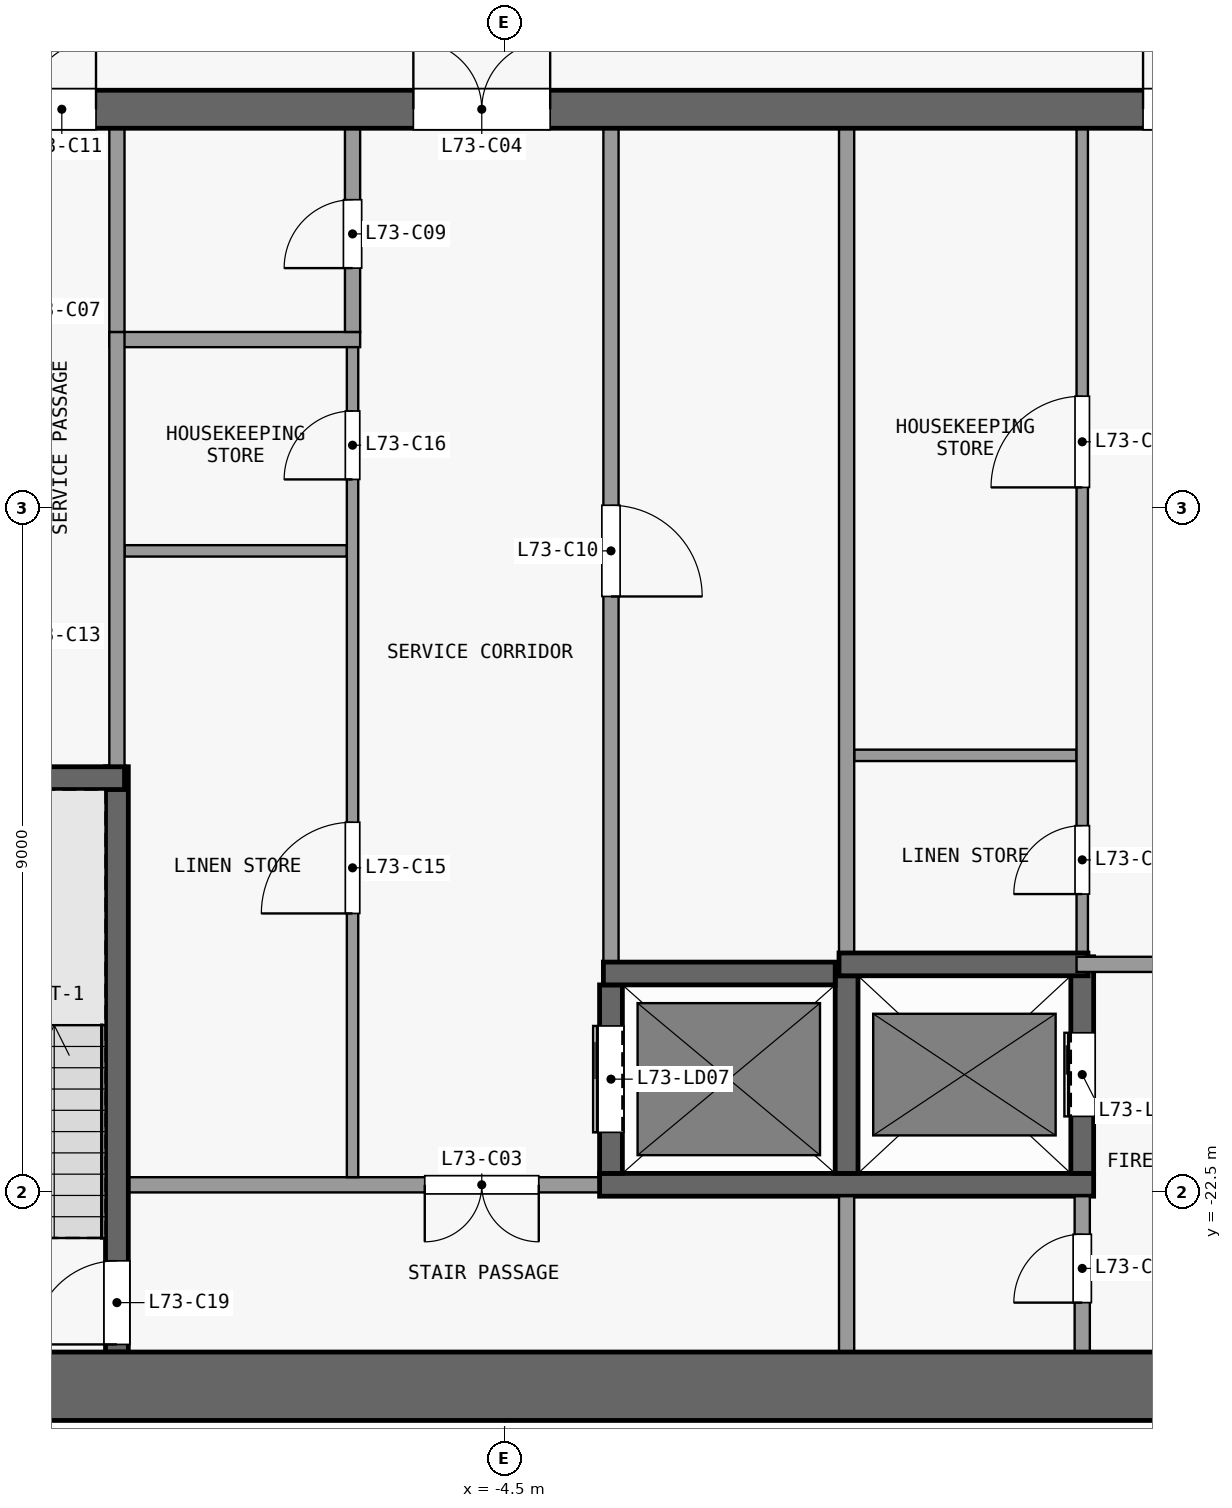
"""IFC4 building model, lengths in metres.
Left out: names, types, materials, properties, quantities, classifications, styles, units other than length and angle.
Written with IfcOpenShell. Run it as: python <this file> out.ifc"""

import sys

from ifc_helpers import new_model, si_unit, direction, frame, frame_2d, origin, place, context, subcontext, project, spatial, rectangle, extrude, element, fill, save


model = new_model("IFC4")
c1 = context("Model", 3, precision=1e-05, world=origin(), true_north=direction((0.0, 1.0)))
c2 = subcontext(c1, "Body", "Model", "MODEL_VIEW")
j1 = project(units=[si_unit("LENGTHUNIT", "METRE"), si_unit("PLANEANGLEUNIT", "RADIAN")], contexts=[c1])
p1 = place(None, origin())
s1 = spatial("IfcSite", under=j1, at=p1, CompositionType="ELEMENT")
p2 = place(p1, origin())
s2 = spatial("IfcBuilding", under=s1, at=p2, CompositionType="ELEMENT")
p3 = place(p2, frame((0.0, 0.0, 287.9)))
s3 = spatial("IfcBuildingStorey", under=s2, at=p3, CompositionType="ELEMENT", Elevation=287.9)
p4 = place(p3, frame((-13.1, -25.05, 0.0), z_axis=(0.0, 0.0, 1.0), x_axis=(1.0, 0.0, 0.0)))
e1 = element("IfcWall", 1, at=p4, inside=s3, PredefinedType="SHEAR", context=c2, shape_type="SweptSolid", body=[
    extrude(rectangle(XDim=26.2, YDim=0.9, at=frame_2d((13.1, 0.0))), origin(), (0.0, 0.0, 1.0), 3.3),
])
p5 = place(p3, frame((-13.1, -8.25, 0.0), z_axis=(0.0, 0.0, 1.0), x_axis=(1.0, 0.0, 0.0)))
e2 = element("IfcWall", 2, at=p5, inside=s3, PredefinedType="SHEAR", context=c2, shape_type="SweptSolid", body=[
    extrude(rectangle(XDim=26.2, YDim=0.5, at=frame_2d((13.1, 0.0))), origin(), (0.0, 0.0, 1.0), 3.3),
])
p6 = place(p5, frame((7.4, 0.0, 0.0)))
e3 = element("IfcOpeningElement", 3, at=p6, cuts=e2, PredefinedType="OPENING", context=c2, shape_type="SweptSolid", body=[
    extrude(rectangle(XDim=1.8, YDim=2.1, at=frame_2d((0.9, 1.05))), frame((0.0, 0.26, 0.0), z_axis=(0.0, -1.0, 0.0), x_axis=(1.0, 0.0, 0.0)), (0.0, 0.0, 1.0), 0.52),
])
p7 = place(p5, frame((17.0, 0.0, 0.0)))
e4 = element("IfcOpeningElement", 4, at=p7, cuts=e2, PredefinedType="OPENING", context=c2, shape_type="SweptSolid", body=[
    extrude(rectangle(XDim=1.8, YDim=2.1, at=frame_2d((0.9, 1.05))), frame((0.0, 0.26, 0.0), z_axis=(0.0, -1.0, 0.0), x_axis=(1.0, 0.0, 0.0)), (0.0, 0.0, 1.0), 0.52),
])
p8 = place(p5, frame((2.325, 0.0, 0.0)))
e5 = element("IfcOpeningElement", 5, at=p8, cuts=e2, PredefinedType="OPENING", context=c2, shape_type="SweptSolid", body=[
    extrude(rectangle(XDim=0.9, YDim=2.1, at=frame_2d((0.45, 1.05))), frame((0.0, 0.26, 0.0), z_axis=(0.0, -1.0, 0.0), x_axis=(1.0, 0.0, 0.0)), (0.0, 0.0, 1.0), 0.52),
])
p9 = place(p5, frame((22.975, 0.0, 0.0)))
e6 = element("IfcOpeningElement", 6, at=p9, cuts=e2, PredefinedType="OPENING", context=c2, shape_type="SweptSolid", body=[
    extrude(rectangle(XDim=0.9, YDim=2.1, at=frame_2d((0.45, 1.05))), frame((0.0, 0.26, 0.0), z_axis=(0.0, -1.0, 0.0), x_axis=(1.0, 0.0, 0.0)), (0.0, 0.0, 1.0), 0.52),
])
p10 = place(p3, frame((-3.25, -22.4, 0.0), z_axis=(0.0, 0.0, 1.0), x_axis=(-1.0, 0.0, 0.0)))
e7 = element("IfcWall", 7, at=p10, inside=s3, PredefinedType="PARTITIONING", context=c2, shape_type="SweptSolid", body=[
    extrude(rectangle(XDim=6.2, YDim=0.2, at=frame_2d((3.1, 0.0))), origin(), (0.0, 0.0, 1.0), 3.3),
])
p11 = place(p10, frame((0.8, 0.0, 0.0)))
e8 = element("IfcOpeningElement", 8, at=p11, cuts=e7, PredefinedType="OPENING", context=c2, shape_type="SweptSolid", body=[
    extrude(rectangle(XDim=1.5, YDim=2.1, at=frame_2d((0.75, 1.05))), frame((0.0, 0.11, 0.0), z_axis=(0.0, -1.0, 0.0), x_axis=(1.0, 0.0, 0.0)), (0.0, 0.0, 1.0), 0.22),
])
p12 = place(p3, frame((-3.25, -22.4, 0.0), z_axis=(0.0, 0.0, 1.0), x_axis=(1.0, 0.0, 0.0)))
e9 = element("IfcWall", 9, at=p12, inside=s3, PredefinedType="SHEAR", context=c2, shape_type="SweptSolid", body=[
    extrude(rectangle(XDim=6.5, YDim=0.3, at=frame_2d((3.25, 0.0))), origin(), (0.0, 0.0, 1.0), 3.3),
])
p13 = place(p3, frame((-3.2, -19.62, 0.0), z_axis=(0.0, 0.0, 1.0), x_axis=(1.0, 0.0, 0.0)))
e10 = element("IfcWall", 10, at=p13, inside=s3, PredefinedType="SHEAR", context=c2, shape_type="SweptSolid", body=[
    extrude(rectangle(XDim=3.05, YDim=0.3, at=frame_2d((1.525, 0.0))), origin(), (0.0, 0.0, 1.0), 3.3),
])
p14 = place(p3, frame((-0.1, -19.5, 0.0), z_axis=(0.0, 0.0, 1.0), x_axis=(1.0, 0.0, 0.0)))
e11 = element("IfcWall", 11, at=p14, inside=s3, PredefinedType="SHEAR", context=c2, shape_type="SweptSolid", body=[
    extrude(rectangle(XDim=3.275, YDim=0.3, at=frame_2d((1.638, 0.0))), origin(), (0.0, 0.0, 1.0), 3.3),
])
p15 = place(p3, frame((6.35, -19.5, 0.0), z_axis=(0.0, 0.0, 1.0), x_axis=(-1.0, 0.0, 0.0)))
e12 = element("IfcWall", 12, at=p15, inside=s3, PredefinedType="PARTITIONING", context=c2, shape_type="SweptSolid", body=[
    extrude(rectangle(XDim=3.325, YDim=0.2, at=frame_2d((1.663, 0.0))), origin(), (0.0, 0.0, 1.0), 3.3),
])
p16 = place(p15, frame((0.8, 0.0, 0.0)))
e13 = element("IfcOpeningElement", 13, at=p16, cuts=e12, PredefinedType="OPENING", context=c2, shape_type="SweptSolid", body=[
    extrude(rectangle(XDim=1.5, YDim=2.1, at=frame_2d((0.75, 1.05))), frame((0.0, 0.11, 0.0), z_axis=(0.0, -1.0, 0.0), x_axis=(1.0, 0.0, 0.0)), (0.0, 0.0, 1.0), 0.22),
])
p17 = place(p3, frame((-12.6, -17.05, 0.0), z_axis=(0.0, 0.0, 1.0), x_axis=(1.0, 0.0, 0.0)))
e14 = element("IfcWall", 14, at=p17, inside=s3, PredefinedType="SHEAR", context=c2, shape_type="SweptSolid", body=[
    extrude(rectangle(XDim=3.1, YDim=0.3, at=frame_2d((1.55, 0.0))), origin(), (0.0, 0.0, 1.0), 3.3),
])
p18 = place(p3, frame((0.1, -16.75, 0.0), z_axis=(0.0, 0.0, 1.0), x_axis=(1.0, 0.0, 0.0)))
e15 = element("IfcWall", 15, at=p18, inside=s3, PredefinedType="PARTITIONING", context=c2, shape_type="SweptSolid", body=[
    extrude(rectangle(XDim=2.925, YDim=0.15, at=frame_2d((1.462, 0.0))), origin(), (0.0, 0.0, 1.0), 3.3),
])
p19 = place(p3, frame((-9.5, -14.06, 0.0), z_axis=(0.0, 0.0, 1.0), x_axis=(1.0, 0.0, 0.0)))
e16 = element("IfcWall", 16, at=p19, inside=s3, PredefinedType="PARTITIONING", context=c2, shape_type="SweptSolid", body=[
    extrude(rectangle(XDim=2.925, YDim=0.15, at=frame_2d((1.462, 0.0))), origin(), (0.0, 0.0, 1.0), 3.3),
])
p20 = place(p3, frame((-9.7, -11.28, 0.0), z_axis=(0.0, 0.0, 1.0), x_axis=(1.0, 0.0, 0.0)))
e17 = element("IfcWall", 17, at=p20, inside=s3, PredefinedType="PARTITIONING", context=c2, shape_type="SweptSolid", body=[
    extrude(rectangle(XDim=3.3, YDim=0.2, at=frame_2d((1.65, 0.0))), origin(), (0.0, 0.0, 1.0), 3.3),
])
p21 = place(p3, frame((-9.6, -24.6, 0.0), z_axis=(0.0, 0.0, 1.0), x_axis=(0.0, 1.0, 0.0)))
e18 = element("IfcWall", 18, at=p21, inside=s3, PredefinedType="SHEAR", context=c2, shape_type="SweptSolid", body=[
    extrude(rectangle(XDim=7.7, YDim=0.3, at=frame_2d((3.85, 0.0))), origin(), (0.0, 0.0, 1.0), 3.3),
])
p22 = place(p21, frame((0.1, 0.0, 0.0)))
e19 = element("IfcOpeningElement", 19, at=p22, cuts=e18, PredefinedType="OPENING", context=c2, shape_type="SweptSolid", body=[
    extrude(rectangle(XDim=1.1, YDim=2.1, at=frame_2d((0.55, 1.05))), frame((0.0, 0.16, 0.0), z_axis=(0.0, -1.0, 0.0), x_axis=(1.0, 0.0, 0.0)), (0.0, 0.0, 1.0), 0.32),
])
p23 = place(p3, frame((-9.6, -16.9, 0.0), z_axis=(0.0, 0.0, 1.0), x_axis=(0.0, 1.0, 0.0)))
e20 = element("IfcWall", 20, at=p23, inside=s3, PredefinedType="PARTITIONING", context=c2, shape_type="SweptSolid", body=[
    extrude(rectangle(XDim=5.72, YDim=0.2, at=frame_2d((2.86, 0.0))), origin(), (0.0, 0.0, 1.0), 3.3),
])
p24 = place(p3, frame((-9.6, -11.18, 0.0), z_axis=(0.0, 0.0, 1.0), x_axis=(0.0, 1.0, 0.0)))
e21 = element("IfcWall", 21, at=p24, inside=s3, PredefinedType="PARTITIONING", context=c2, shape_type="SweptSolid", body=[
    extrude(rectangle(XDim=2.68, YDim=0.2, at=frame_2d((1.34, 0.0))), origin(), (0.0, 0.0, 1.0), 3.3),
])
p25 = place(p3, frame((-6.5, -22.3, 0.0), z_axis=(0.0, 0.0, 1.0), x_axis=(0.0, 1.0, 0.0)))
e22 = element("IfcWall", 22, at=p25, inside=s3, PredefinedType="PARTITIONING", context=c2, shape_type="SweptSolid", body=[
    extrude(rectangle(XDim=10.92, YDim=0.15, at=frame_2d((5.46, 0.0))), origin(), (0.0, 0.0, 1.0), 3.3),
])
p26 = place(p25, frame((3.47, 0.0, 0.0)))
e23 = element("IfcOpeningElement", 23, at=p26, cuts=e22, PredefinedType="OPENING", context=c2, shape_type="SweptSolid", body=[
    extrude(rectangle(XDim=1.2, YDim=2.1, at=frame_2d((0.6, 1.05))), frame((0.0, 0.085, 0.0), z_axis=(0.0, -1.0, 0.0), x_axis=(1.0, 0.0, 0.0)), (0.0, 0.0, 1.0), 0.17),
])
p27 = place(p25, frame((9.18, 0.0, 0.0)))
e24 = element("IfcOpeningElement", 24, at=p27, cuts=e22, PredefinedType="OPENING", context=c2, shape_type="SweptSolid", body=[
    extrude(rectangle(XDim=0.9, YDim=2.1, at=frame_2d((0.45, 1.05))), frame((0.0, 0.085, 0.0), z_axis=(0.0, -1.0, 0.0), x_axis=(1.0, 0.0, 0.0)), (0.0, 0.0, 1.0), 0.17),
])
p28 = place(p3, frame((-6.5, -11.18, 0.0), z_axis=(0.0, 0.0, 1.0), x_axis=(0.0, 1.0, 0.0)))
e25 = element("IfcWall", 25, at=p28, inside=s3, PredefinedType="PARTITIONING", context=c2, shape_type="SweptSolid", body=[
    extrude(rectangle(XDim=2.68, YDim=0.2, at=frame_2d((1.34, 0.0))), origin(), (0.0, 0.0, 1.0), 3.3),
])
p29 = place(p28, frame((0.84, 0.0, 0.0)))
e26 = element("IfcOpeningElement", 26, at=p29, cuts=e25, PredefinedType="OPENING", context=c2, shape_type="SweptSolid", body=[
    extrude(rectangle(XDim=0.9, YDim=2.1, at=frame_2d((0.45, 1.05))), frame((0.0, 0.11, 0.0), z_axis=(0.0, -1.0, 0.0), x_axis=(1.0, 0.0, 0.0)), (0.0, 0.0, 1.0), 0.22),
])
p30 = place(p3, frame((-3.1, -22.25, 0.0), z_axis=(0.0, 0.0, 1.0), x_axis=(0.0, 1.0, 0.0)))
e27 = element("IfcWall", 27, at=p30, inside=s3, PredefinedType="SHEAR", context=c2, shape_type="SweptSolid", body=[
    extrude(rectangle(XDim=2.48, YDim=0.3, at=frame_2d((1.24, 0.0))), origin(), (0.0, 0.0, 1.0), 3.3),
])
p31 = place(p30, frame((0.54, 0.0, 0.0)))
e28 = element("IfcOpeningElement", 28, at=p31, cuts=e27, PredefinedType="OPENING", context=c2, shape_type="SweptSolid", body=[
    extrude(rectangle(XDim=1.4, YDim=2.1, at=frame_2d((0.7, 1.05))), frame((0.0, 0.16, 0.0), z_axis=(0.0, -1.0, 0.0), x_axis=(1.0, 0.0, 0.0)), (0.0, 0.0, 1.0), 0.32),
])
p32 = place(p3, frame((-3.1, -8.5, 0.0), z_axis=(0.0, 0.0, 1.0), x_axis=(0.0, -1.0, 0.0)))
e29 = element("IfcWall", 29, at=p32, inside=s3, PredefinedType="PARTITIONING", context=c2, shape_type="SweptSolid", body=[
    extrude(rectangle(XDim=10.97, YDim=0.2, at=frame_2d((5.485, 0.0))), origin(), (0.0, 0.0, 1.0), 3.3),
])
p33 = place(p32, frame((4.96, 0.0, 0.0)))
e30 = element("IfcOpeningElement", 30, at=p33, cuts=e29, PredefinedType="OPENING", context=c2, shape_type="SweptSolid", body=[
    extrude(rectangle(XDim=1.2, YDim=2.1, at=frame_2d((0.6, 1.05))), frame((0.0, 0.11, 0.0), z_axis=(0.0, -1.0, 0.0), x_axis=(1.0, 0.0, 0.0)), (0.0, 0.0, 1.0), 0.22),
])
p34 = place(p3, frame((0.0, -24.6, 0.0), z_axis=(0.0, 0.0, 1.0), x_axis=(0.0, 1.0, 0.0)))
e31 = element("IfcWall", 31, at=p34, inside=s3, PredefinedType="PARTITIONING", context=c2, shape_type="SweptSolid", body=[
    extrude(rectangle(XDim=2.05, YDim=0.2, at=frame_2d((1.025, 0.0))), origin(), (0.0, 0.0, 1.0), 3.3),
])
p35 = place(p3, frame((0.0, -22.25, 0.0), z_axis=(0.0, 0.0, 1.0), x_axis=(0.0, 1.0, 0.0)))
e32 = element("IfcWall", 32, at=p35, inside=s3, PredefinedType="SHEAR", context=c2, shape_type="SweptSolid", body=[
    extrude(rectangle(XDim=2.6, YDim=0.3, at=frame_2d((1.3, 0.0))), origin(), (0.0, 0.0, 1.0), 3.3),
])
p36 = place(p3, frame((0.0, -19.35, 0.0), z_axis=(0.0, 0.0, 1.0), x_axis=(0.0, 1.0, 0.0)))
e33 = element("IfcWall", 33, at=p36, inside=s3, PredefinedType="PARTITIONING", context=c2, shape_type="SweptSolid", body=[
    extrude(rectangle(XDim=10.85, YDim=0.2, at=frame_2d((5.425, 0.0))), origin(), (0.0, 0.0, 1.0), 3.3),
])
p37 = place(p3, frame((3.1, -24.6, 0.0), z_axis=(0.0, 0.0, 1.0), x_axis=(0.0, 1.0, 0.0)))
e34 = element("IfcWall", 34, at=p37, inside=s3, PredefinedType="PARTITIONING", context=c2, shape_type="SweptSolid", body=[
    extrude(rectangle(XDim=2.05, YDim=0.2, at=frame_2d((1.025, 0.0))), origin(), (0.0, 0.0, 1.0), 3.3),
])
p38 = place(p37, frame((0.65, 0.0, 0.0)))
e35 = element("IfcOpeningElement", 35, at=p38, cuts=e34, PredefinedType="OPENING", context=c2, shape_type="SweptSolid", body=[
    extrude(rectangle(XDim=0.9, YDim=2.1, at=frame_2d((0.45, 1.05))), frame((0.0, 0.11, 0.0), z_axis=(0.0, -1.0, 0.0), x_axis=(1.0, 0.0, 0.0)), (0.0, 0.0, 1.0), 0.22),
])
p39 = place(p3, frame((3.1, -22.25, 0.0), z_axis=(0.0, 0.0, 1.0), x_axis=(0.0, 1.0, 0.0)))
e36 = element("IfcWall", 36, at=p39, inside=s3, PredefinedType="SHEAR", context=c2, shape_type="SweptSolid", body=[
    extrude(rectangle(XDim=2.85, YDim=0.3, at=frame_2d((1.425, 0.0))), origin(), (0.0, 0.0, 1.0), 3.3),
])
p40 = place(p39, frame((0.75, 0.0, 0.0)))
e37 = element("IfcOpeningElement", 37, at=p40, cuts=e36, PredefinedType="OPENING", context=c2, shape_type="SweptSolid", body=[
    extrude(rectangle(XDim=1.1, YDim=2.1, at=frame_2d((0.55, 1.05))), frame((0.0, 0.16, 0.0), z_axis=(0.0, -1.0, 0.0), x_axis=(1.0, 0.0, 0.0)), (0.0, 0.0, 1.0), 0.32),
])
p41 = place(p3, frame((3.1, -19.4, 0.0), z_axis=(0.0, 0.0, 1.0), x_axis=(0.0, 1.0, 0.0)))
e38 = element("IfcWall", 38, at=p41, inside=s3, PredefinedType="PARTITIONING", context=c2, shape_type="SweptSolid", body=[
    extrude(rectangle(XDim=10.9, YDim=0.15, at=frame_2d((5.45, 0.0))), origin(), (0.0, 0.0, 1.0), 3.3),
])
p42 = place(p41, frame((0.825, 0.0, 0.0)))
e39 = element("IfcOpeningElement", 39, at=p42, cuts=e38, PredefinedType="OPENING", context=c2, shape_type="SweptSolid", body=[
    extrude(rectangle(XDim=0.9, YDim=2.1, at=frame_2d((0.45, 1.05))), frame((0.0, 0.085, 0.0), z_axis=(0.0, -1.0, 0.0), x_axis=(1.0, 0.0, 0.0)), (0.0, 0.0, 1.0), 0.17),
])
p43 = place(p41, frame((6.175, 0.0, 0.0)))
e40 = element("IfcOpeningElement", 40, at=p43, cuts=e38, PredefinedType="OPENING", context=c2, shape_type="SweptSolid", body=[
    extrude(rectangle(XDim=1.2, YDim=2.1, at=frame_2d((0.6, 1.05))), frame((0.0, 0.085, 0.0), z_axis=(0.0, -1.0, 0.0), x_axis=(1.0, 0.0, 0.0)), (0.0, 0.0, 1.0), 0.17),
])
p44 = place(p40, origin())
e41 = element("IfcDoor", 41, at=p44, inside=s3, OperationType="DOUBLE_DOOR_SLIDING", PredefinedType="DOOR", context=c2, shape_type="SweptSolid", body=[
    extrude(rectangle(XDim=1.1, YDim=2.1, at=frame_2d((0.55, 1.05))), frame((0.0, 0.025, 0.0), z_axis=(0.0, -1.0, 0.0), x_axis=(1.0, 0.0, 0.0)), (0.0, 0.0, 1.0), 0.05),
])
fill(e37, e41)
p45 = place(p31, origin())
e42 = element("IfcDoor", 42, at=p45, inside=s3, OperationType="DOUBLE_DOOR_SLIDING", PredefinedType="DOOR", context=c2, shape_type="SweptSolid", body=[
    extrude(rectangle(XDim=1.4, YDim=2.1, at=frame_2d((0.7, 1.05))), frame((0.0, 0.025, 0.0), z_axis=(0.0, -1.0, 0.0), x_axis=(1.0, 0.0, 0.0)), (0.0, 0.0, 1.0), 0.05),
])
fill(e28, e42)
p46 = place(p11, origin())
e43 = element("IfcDoor", 43, at=p46, inside=s3, OperationType="DOUBLE_DOOR_SINGLE_SWING", PredefinedType="DOOR", context=c2, shape_type="SweptSolid", body=[
    extrude(rectangle(XDim=1.5, YDim=2.1, at=frame_2d((0.75, 1.05))), frame((0.0, 0.025, 0.0), z_axis=(0.0, -1.0, 0.0), x_axis=(1.0, 0.0, 0.0)), (0.0, 0.0, 1.0), 0.05),
])
fill(e8, e43)
p47 = place(p6, origin())
e44 = element("IfcDoor", 44, at=p47, inside=s3, OperationType="DOUBLE_DOOR_SINGLE_SWING", PredefinedType="DOOR", context=c2, shape_type="SweptSolid", body=[
    extrude(rectangle(XDim=1.8, YDim=2.1, at=frame_2d((0.9, 1.05))), frame((0.0, 0.025, 0.0), z_axis=(0.0, -1.0, 0.0), x_axis=(1.0, 0.0, 0.0)), (0.0, 0.0, 1.0), 0.05),
])
fill(e3, e44)
p48 = place(p7, origin())
e45 = element("IfcDoor", 45, at=p48, inside=s3, OperationType="DOUBLE_DOOR_SINGLE_SWING", PredefinedType="DOOR", context=c2, shape_type="SweptSolid", body=[
    extrude(rectangle(XDim=1.8, YDim=2.1, at=frame_2d((0.9, 1.05))), frame((0.0, 0.025, 0.0), z_axis=(0.0, -1.0, 0.0), x_axis=(1.0, 0.0, 0.0)), (0.0, 0.0, 1.0), 0.05),
])
fill(e4, e45)
p49 = place(p38, origin())
e46 = element("IfcDoor", 46, at=p49, inside=s3, OperationType="SINGLE_SWING_LEFT", PredefinedType="DOOR", context=c2, shape_type="SweptSolid", body=[
    extrude(rectangle(XDim=0.9, YDim=2.1, at=frame_2d((0.45, 1.05))), frame((0.0, 0.025, 0.0), z_axis=(0.0, -1.0, 0.0), x_axis=(1.0, 0.0, 0.0)), (0.0, 0.0, 1.0), 0.05),
])
fill(e35, e46)
p50 = place(p29, origin())
e47 = element("IfcDoor", 47, at=p50, inside=s3, OperationType="SINGLE_SWING_LEFT", PredefinedType="DOOR", context=c2, shape_type="SweptSolid", body=[
    extrude(rectangle(XDim=0.9, YDim=2.1, at=frame_2d((0.45, 1.05))), frame((0.0, 0.025, 0.0), z_axis=(0.0, -1.0, 0.0), x_axis=(1.0, 0.0, 0.0)), (0.0, 0.0, 1.0), 0.05),
])
fill(e26, e47)
p51 = place(p33, origin())
e48 = element("IfcDoor", 48, at=p51, inside=s3, OperationType="SINGLE_SWING_RIGHT", PredefinedType="DOOR", context=c2, shape_type="SweptSolid", body=[
    extrude(rectangle(XDim=1.2, YDim=2.1, at=frame_2d((0.6, 1.05))), frame((0.0, 0.025, 0.0), z_axis=(0.0, -1.0, 0.0), x_axis=(1.0, 0.0, 0.0)), (0.0, 0.0, 1.0), 0.05),
])
fill(e30, e48)
p52 = place(p8, origin())
e49 = element("IfcDoor", 49, at=p52, inside=s3, OperationType="SINGLE_SWING_RIGHT", PredefinedType="DOOR", context=c2, shape_type="SweptSolid", body=[
    extrude(rectangle(XDim=0.9, YDim=2.1, at=frame_2d((0.45, 1.05))), frame((0.0, 0.025, 0.0), z_axis=(0.0, -1.0, 0.0), x_axis=(1.0, 0.0, 0.0)), (0.0, 0.0, 1.0), 0.05),
])
fill(e5, e49)
p53 = place(p26, origin())
e50 = element("IfcDoor", 50, at=p53, inside=s3, OperationType="SINGLE_SWING_LEFT", PredefinedType="DOOR", context=c2, shape_type="SweptSolid", body=[
    extrude(rectangle(XDim=1.2, YDim=2.1, at=frame_2d((0.6, 1.05))), frame((0.0, 0.025, 0.0), z_axis=(0.0, -1.0, 0.0), x_axis=(1.0, 0.0, 0.0)), (0.0, 0.0, 1.0), 0.05),
])
fill(e23, e50)
p54 = place(p27, origin())
e51 = element("IfcDoor", 51, at=p54, inside=s3, OperationType="SINGLE_SWING_LEFT", PredefinedType="DOOR", context=c2, shape_type="SweptSolid", body=[
    extrude(rectangle(XDim=0.9, YDim=2.1, at=frame_2d((0.45, 1.05))), frame((0.0, 0.025, 0.0), z_axis=(0.0, -1.0, 0.0), x_axis=(1.0, 0.0, 0.0)), (0.0, 0.0, 1.0), 0.05),
])
fill(e24, e51)
p55 = place(p42, origin())
e52 = element("IfcDoor", 52, at=p55, inside=s3, OperationType="SINGLE_SWING_LEFT", PredefinedType="DOOR", context=c2, shape_type="SweptSolid", body=[
    extrude(rectangle(XDim=0.9, YDim=2.1, at=frame_2d((0.45, 1.05))), frame((0.0, 0.025, 0.0), z_axis=(0.0, -1.0, 0.0), x_axis=(1.0, 0.0, 0.0)), (0.0, 0.0, 1.0), 0.05),
])
fill(e39, e52)
p56 = place(p43, origin())
e53 = element("IfcDoor", 53, at=p56, inside=s3, OperationType="SINGLE_SWING_LEFT", PredefinedType="DOOR", context=c2, shape_type="SweptSolid", body=[
    extrude(rectangle(XDim=1.2, YDim=2.1, at=frame_2d((0.6, 1.05))), frame((0.0, 0.025, 0.0), z_axis=(0.0, -1.0, 0.0), x_axis=(1.0, 0.0, 0.0)), (0.0, 0.0, 1.0), 0.05),
])
fill(e40, e53)
p57 = place(p22, origin())
e54 = element("IfcDoor", 54, at=p57, inside=s3, OperationType="SINGLE_SWING_LEFT", PredefinedType="DOOR", context=c2, shape_type="SweptSolid", body=[
    extrude(rectangle(XDim=1.1, YDim=2.1, at=frame_2d((0.55, 1.05))), frame((0.0, 0.025, 0.0), z_axis=(0.0, -1.0, 0.0), x_axis=(1.0, 0.0, 0.0)), (0.0, 0.0, 1.0), 0.05),
])
fill(e19, e54)
save(model, sys.argv[1])
